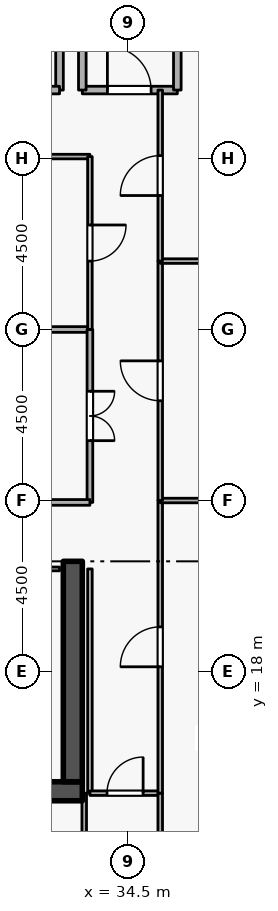
"""IFC4 building model, lengths in metres.
Left out: names, types, materials, properties, quantities, classifications, styles, units other than length and angle.
Written with IfcOpenShell. Run it as: python <this file> out.ifc"""

import sys

from ifc_helpers import new_model, si_unit, direction, frame, frame_2d, origin, place, context, subcontext, project, spatial, rectangle, extrude, element, fill, save


model = new_model("IFC4")
c1 = context("Model", 3, precision=1e-05, world=origin(), true_north=direction((0.0, 1.0)))
c2 = subcontext(c1, "Body", "Model", "MODEL_VIEW")
j1 = project(units=[si_unit("LENGTHUNIT", "METRE"), si_unit("PLANEANGLEUNIT", "RADIAN")], contexts=[c1])
p1 = place(None, origin())
s1 = spatial("IfcSite", under=j1, at=p1, CompositionType="ELEMENT")
p2 = place(p1, origin())
s2 = spatial("IfcBuilding", under=s1, at=p2, CompositionType="ELEMENT")
p3 = place(p2, frame((0.0, 0.0, 269.1)))
s3 = spatial("IfcBuildingStorey", under=s2, at=p3, CompositionType="ELEMENT", Elevation=269.1)
p4 = place(p3, frame((17.7, 14.85, 0.0), z_axis=(0.0, 0.0, 1.0), x_axis=(1.0, 0.0, 0.0)))
e1 = element("IfcWall", 1, at=p4, inside=s3, PredefinedType="SHEAR", context=c2, shape_type="SweptSolid", body=[
    extrude(rectangle(XDim=15.6, YDim=0.5, at=frame_2d((7.8, 0.0))), origin(), (0.0, 0.0, 1.0), 3.6),
])
p5 = place(p3, frame((33.05, 15.1, 0.0), z_axis=(0.0, 0.0, 1.0), x_axis=(0.0, 1.0, 0.0)))
e2 = element("IfcWall", 2, at=p5, inside=s3, PredefinedType="SHEAR", context=c2, shape_type="SweptSolid", body=[
    extrude(rectangle(XDim=5.8, YDim=0.5, at=frame_2d((2.9, 0.0))), origin(), (0.0, 0.0, 1.0), 3.6),
])
p6 = place(p3, frame((33.3, 33.3, 0.0), z_axis=(0.0, 0.0, 1.0), x_axis=(1.0, 0.0, 0.0)))
e3 = element("IfcWall", 3, at=p6, inside=s3, PredefinedType="STANDARD", context=c2, shape_type="SweptSolid", body=[
    extrude(rectangle(XDim=2.5, YDim=0.2, at=frame_2d((1.25, 0.0))), origin(), (0.0, 0.0, 1.0), 3.34),
])
p7 = place(p6, frame((0.66, 0.0, 0.0)))
e4 = element("IfcOpeningElement", 4, at=p7, cuts=e3, PredefinedType="OPENING", context=c2, shape_type="SweptSolid", body=[
    extrude(rectangle(XDim=1.15, YDim=2.1, at=frame_2d((0.575, 1.05))), frame((0.0, 0.11, 0.0), z_axis=(0.0, -1.0, 0.0), x_axis=(1.0, 0.0, 0.0)), (0.0, 0.0, 1.0), 0.22),
])
p8 = place(p3, frame((35.8, 33.3, 0.0), z_axis=(0.0, 0.0, 1.0), x_axis=(0.0, 1.0, 0.0)))
e5 = element("IfcWall", 5, at=p8, inside=s3, PredefinedType="STANDARD", context=c2, shape_type="SweptSolid", body=[
    extrude(rectangle(XDim=5.7, YDim=0.2, at=frame_2d((2.85, 0.0))), origin(), (0.0, 0.0, 1.0), 3.34),
])
p9 = place(p3, frame((33.3, 35.6, 0.0), z_axis=(0.0, 0.0, 1.0), x_axis=(0.0, -1.0, 0.0)))
e6 = element("IfcWall", 6, at=p9, inside=s3, PredefinedType="STANDARD", context=c2, shape_type="SweptSolid", body=[
    extrude(rectangle(XDim=2.3, YDim=0.2, at=frame_2d((1.15, 0.0))), origin(), (0.0, 0.0, 1.0), 2.545),
])
p10 = place(p3, frame((32.7, 35.35, 0.0), z_axis=(0.0, 0.0, 1.0), x_axis=(0.0, -1.0, 0.0)))
e7 = element("IfcWall", 7, at=p10, inside=s3, PredefinedType="STANDARD", context=c2, shape_type="SweptSolid", body=[
    extrude(rectangle(XDim=2.05, YDim=0.2, at=frame_2d((1.025, 0.0))), origin(), (0.0, 0.0, 1.0), 2.545),
])
p11 = place(p3, frame((32.7, 33.3, 0.0), z_axis=(0.0, 0.0, 1.0), x_axis=(-1.0, 0.0, 0.0)))
e8 = element("IfcWall", 8, at=p11, inside=s3, PredefinedType="STANDARD", context=c2, shape_type="SweptSolid", body=[
    extrude(rectangle(XDim=2.35, YDim=0.2, at=frame_2d((1.175, 0.0))), origin(), (0.0, 0.0, 1.0), 3.34),
])
p12 = place(p11, frame((0.6, 0.0, 0.0)))
e9 = element("IfcOpeningElement", 9, at=p12, cuts=e8, PredefinedType="OPENING", context=c2, shape_type="SweptSolid", body=[
    extrude(rectangle(XDim=1.15, YDim=2.1, at=frame_2d((0.575, 1.05))), frame((0.0, 0.11, 0.0), z_axis=(0.0, -1.0, 0.0), x_axis=(1.0, 0.0, 0.0)), (0.0, 0.0, 1.0), 0.22),
])
p13 = place(p3, frame((30.55, 20.7, 0.0), z_axis=(0.0, 0.0, 1.0), x_axis=(1.0, 0.0, 0.0)))
e10 = element("IfcWall", 10, at=p13, inside=s3, PredefinedType="PARTITIONING", context=c2, shape_type="SweptSolid", body=[
    extrude(rectangle(XDim=2.15, YDim=0.1, at=frame_2d((1.075, 0.0))), origin(), (0.0, 0.0, 1.0), 3.34),
])
p14 = place(p13, frame((0.6, 0.0, 0.0)))
e11 = element("IfcOpeningElement", 11, at=p14, cuts=e10, PredefinedType="OPENING", context=c2, shape_type="SweptSolid", body=[
    extrude(rectangle(XDim=0.95, YDim=2.1, at=frame_2d((0.475, 1.05))), frame((0.0, 0.06, 0.0), z_axis=(0.0, -1.0, 0.0), x_axis=(1.0, 0.0, 0.0)), (0.0, 0.0, 1.0), 0.12),
])
p15 = place(p3, frame((33.5, 20.7, 0.0), z_axis=(0.0, 0.0, 1.0), x_axis=(0.0, -1.0, 0.0)))
e12 = element("IfcWall", 12, at=p15, inside=s3, PredefinedType="PARTITIONING", context=c2, shape_type="SweptSolid", body=[
    extrude(rectangle(XDim=5.9, YDim=0.12, at=frame_2d((2.95, 0.0))), origin(), (0.0, 0.0, 1.0), 3.34),
])
p16 = place(p3, frame((33.5, 14.8, 0.0), z_axis=(0.0, 0.0, 1.0), x_axis=(1.0, 0.0, 0.0)))
e13 = element("IfcWall", 13, at=p16, inside=s3, PredefinedType="PARTITIONING", context=c2, shape_type="SweptSolid", body=[
    extrude(rectangle(XDim=1.85, YDim=0.12, at=frame_2d((0.925, 0.0))), origin(), (0.0, 0.0, 1.0), 3.34),
])
p17 = place(p16, frame((0.45, 0.0, 0.0)))
e14 = element("IfcOpeningElement", 14, at=p17, cuts=e13, PredefinedType="OPENING", context=c2, shape_type="SweptSolid", body=[
    extrude(rectangle(XDim=0.95, YDim=2.1, at=frame_2d((0.475, 1.05))), frame((0.0, 0.07, 0.0), z_axis=(0.0, -1.0, 0.0), x_axis=(1.0, 0.0, 0.0)), (0.0, 0.0, 1.0), 0.14),
])
for number, where, z_axis, x_axis in (
    (15, (35.35, 14.8, 0.0), (0.0, 0.0, 1.0), (0.0, -1.0, 0.0)),
    (16, (33.35, 3.28, 0.0), (0.0, 0.0, 1.0), (0.0, 1.0, 0.0)),
):
    element("IfcWall", number, at=place(p3, frame(where, z_axis=z_axis, x_axis=x_axis)), inside=s3, PredefinedType="PARTITIONING", context=c2, shape_type="SweptSolid", body=[
        extrude(rectangle(XDim=11.52, YDim=0.12, at=frame_2d((5.76, 0.0))), origin(), (0.0, 0.0, 1.0), 3.34),
    ])
p18 = place(p3, frame((35.35, 14.8, 0.0), z_axis=(0.0, 0.0, 1.0), x_axis=(0.0, 1.0, 0.0)))
e17 = element("IfcWall", 17, at=p18, inside=s3, PredefinedType="PARTITIONING", context=c2, shape_type="SweptSolid", body=[
    extrude(rectangle(XDim=7.7, YDim=0.12, at=frame_2d((3.85, 0.0))), origin(), (0.0, 0.0, 1.0), 3.34),
])
p19 = place(p18, frame((3.325, 0.0, 0.0)))
e18 = element("IfcOpeningElement", 18, at=p19, cuts=e17, PredefinedType="OPENING", context=c2, shape_type="SweptSolid", body=[
    extrude(rectangle(XDim=1.05, YDim=2.1, at=frame_2d((0.525, 1.05))), frame((0.0, 0.07, 0.0), z_axis=(0.0, -1.0, 0.0), x_axis=(1.0, 0.0, 0.0)), (0.0, 0.0, 1.0), 0.14),
])
p20 = place(p3, frame((35.35, 22.5, 0.0), z_axis=(0.0, 0.0, 1.0), x_axis=(1.0, 0.0, 0.0)))
e19 = element("IfcWall", 19, at=p20, inside=s3, PredefinedType="PARTITIONING", context=c2, shape_type="SweptSolid", body=[
    extrude(rectangle(XDim=13.87, YDim=0.12, at=frame_2d((6.935, 0.0))), origin(), (0.0, 0.0, 1.0), 3.34),
])
p21 = place(p3, frame((35.35, 22.5, 0.0), z_axis=(0.0, 0.0, 1.0), x_axis=(0.0, 1.0, 0.0)))
e20 = element("IfcWall", 20, at=p21, inside=s3, PredefinedType="PARTITIONING", context=c2, shape_type="SweptSolid", body=[
    extrude(rectangle(XDim=6.3, YDim=0.12, at=frame_2d((3.15, 0.0))), origin(), (0.0, 0.0, 1.0), 3.34),
])
p22 = place(p21, frame((2.625, 0.0, 0.0)))
e21 = element("IfcOpeningElement", 21, at=p22, cuts=e20, PredefinedType="OPENING", context=c2, shape_type="SweptSolid", body=[
    extrude(rectangle(XDim=1.05, YDim=2.1, at=frame_2d((0.525, 1.05))), frame((0.0, 0.07, 0.0), z_axis=(0.0, -1.0, 0.0), x_axis=(1.0, 0.0, 0.0)), (0.0, 0.0, 1.0), 0.14),
])
p23 = place(p3, frame((35.35, 28.8, 0.0), z_axis=(0.0, 0.0, 1.0), x_axis=(1.0, 0.0, 0.0)))
e22 = element("IfcWall", 22, at=p23, inside=s3, PredefinedType="PARTITIONING", context=c2, shape_type="SweptSolid", body=[
    extrude(rectangle(XDim=13.87, YDim=0.12, at=frame_2d((6.935, 0.0))), origin(), (0.0, 0.0, 1.0), 3.34),
])
p24 = place(p3, frame((35.35, 28.8, 0.0), z_axis=(0.0, 0.0, 1.0), x_axis=(0.0, 1.0, 0.0)))
e23 = element("IfcWall", 23, at=p24, inside=s3, PredefinedType="PARTITIONING", context=c2, shape_type="SweptSolid", body=[
    extrude(rectangle(XDim=4.5, YDim=0.12, at=frame_2d((2.25, 0.0))), origin(), (0.0, 0.0, 1.0), 3.34),
])
p25 = place(p24, frame((1.725, 0.0, 0.0)))
e24 = element("IfcOpeningElement", 24, at=p25, cuts=e23, PredefinedType="OPENING", context=c2, shape_type="SweptSolid", body=[
    extrude(rectangle(XDim=1.05, YDim=2.1, at=frame_2d((0.525, 1.05))), frame((0.0, 0.07, 0.0), z_axis=(0.0, -1.0, 0.0), x_axis=(1.0, 0.0, 0.0)), (0.0, 0.0, 1.0), 0.14),
])
p26 = place(p3, frame((30.7, 27.0, 0.0), z_axis=(0.0, 0.0, 1.0), x_axis=(1.0, 0.0, 0.0)))
e25 = element("IfcWall", 25, at=p26, inside=s3, PredefinedType="PARTITIONING", context=c2, shape_type="SweptSolid", body=[
    extrude(rectangle(XDim=2.8, YDim=0.15, at=frame_2d((1.4, 0.0))), origin(), (0.0, 0.0, 1.0), 3.34),
])
p27 = place(p3, frame((33.5, 27.0, 0.0), z_axis=(0.0, 0.0, 1.0), x_axis=(0.0, -1.0, 0.0)))
e26 = element("IfcWall", 26, at=p27, inside=s3, PredefinedType="PARTITIONING", context=c2, shape_type="SweptSolid", body=[
    extrude(rectangle(XDim=4.55, YDim=0.15, at=frame_2d((2.275, 0.0))), origin(), (0.0, 0.0, 1.0), 3.34),
])
p28 = place(p27, frame((1.625, 0.0, 0.0)))
e27 = element("IfcOpeningElement", 27, at=p28, cuts=e26, PredefinedType="OPENING", context=c2, shape_type="SweptSolid", body=[
    extrude(rectangle(XDim=1.3, YDim=2.12, at=frame_2d((0.65, 1.06))), frame((0.0, 0.085, 0.0), z_axis=(0.0, -1.0, 0.0), x_axis=(1.0, 0.0, 0.0)), (0.0, 0.0, 1.0), 0.17),
])
p29 = place(p3, frame((33.5, 22.45, 0.0), z_axis=(0.0, 0.0, 1.0), x_axis=(-1.0, 0.0, 0.0)))
e28 = element("IfcWall", 28, at=p29, inside=s3, PredefinedType="PARTITIONING", context=c2, shape_type="SweptSolid", body=[
    extrude(rectangle(XDim=2.8, YDim=0.15, at=frame_2d((1.4, 0.0))), origin(), (0.0, 0.0, 1.0), 3.34),
])
p30 = place(p3, frame((30.7, 31.55, 0.0), z_axis=(0.0, 0.0, 1.0), x_axis=(1.0, 0.0, 0.0)))
e29 = element("IfcWall", 29, at=p30, inside=s3, PredefinedType="PARTITIONING", context=c2, shape_type="SweptSolid", body=[
    extrude(rectangle(XDim=2.8, YDim=0.12, at=frame_2d((1.4, 0.0))), origin(), (0.0, 0.0, 1.0), 3.34),
])
p31 = place(p3, frame((33.5, 31.55, 0.0), z_axis=(0.0, 0.0, 1.0), x_axis=(0.0, -1.0, 0.0)))
e30 = element("IfcWall", 30, at=p31, inside=s3, PredefinedType="PARTITIONING", context=c2, shape_type="SweptSolid", body=[
    extrude(rectangle(XDim=4.55, YDim=0.12, at=frame_2d((2.275, 0.0))), origin(), (0.0, 0.0, 1.0), 3.34),
])
p32 = place(p31, frame((1.8, 0.0, 0.0)))
e31 = element("IfcOpeningElement", 31, at=p32, cuts=e30, PredefinedType="OPENING", context=c2, shape_type="SweptSolid", body=[
    extrude(rectangle(XDim=0.95, YDim=2.1, at=frame_2d((0.475, 1.05))), frame((0.0, 0.07, 0.0), z_axis=(0.0, -1.0, 0.0), x_axis=(1.0, 0.0, 0.0)), (0.0, 0.0, 1.0), 0.14),
])
p33 = place(p7, origin())
e32 = element("IfcDoor", 32, at=p33, inside=s3, OperationType="SINGLE_SWING_LEFT", PredefinedType="DOOR", context=c2, shape_type="SweptSolid", body=[
    extrude(rectangle(XDim=1.15, YDim=2.1, at=frame_2d((0.575, 1.05))), frame((0.0, 0.025, 0.0), z_axis=(0.0, -1.0, 0.0), x_axis=(1.0, 0.0, 0.0)), (0.0, 0.0, 1.0), 0.05),
])
fill(e4, e32)
p34 = place(p17, origin())
e33 = element("IfcDoor", 33, at=p34, inside=s3, OperationType="SINGLE_SWING_RIGHT", PredefinedType="DOOR", context=c2, shape_type="SweptSolid", body=[
    extrude(rectangle(XDim=0.95, YDim=2.1, at=frame_2d((0.475, 1.05))), frame((0.0, 0.025, 0.0), z_axis=(0.0, -1.0, 0.0), x_axis=(1.0, 0.0, 0.0)), (0.0, 0.0, 1.0), 0.05),
])
fill(e14, e33)
p35 = place(p19, origin())
e34 = element("IfcDoor", 34, at=p35, inside=s3, OperationType="SINGLE_SWING_LEFT", PredefinedType="DOOR", context=c2, shape_type="SweptSolid", body=[
    extrude(rectangle(XDim=1.05, YDim=2.1, at=frame_2d((0.525, 1.05))), frame((0.0, 0.025, 0.0), z_axis=(0.0, -1.0, 0.0), x_axis=(1.0, 0.0, 0.0)), (0.0, 0.0, 1.0), 0.05),
])
fill(e18, e34)
p36 = place(p22, origin())
e35 = element("IfcDoor", 35, at=p36, inside=s3, OperationType="SINGLE_SWING_RIGHT", PredefinedType="DOOR", context=c2, shape_type="SweptSolid", body=[
    extrude(rectangle(XDim=1.05, YDim=2.1, at=frame_2d((0.525, 1.05))), frame((0.0, 0.025, 0.0), z_axis=(0.0, -1.0, 0.0), x_axis=(1.0, 0.0, 0.0)), (0.0, 0.0, 1.0), 0.05),
])
fill(e21, e35)
p37 = place(p25, origin())
e36 = element("IfcDoor", 36, at=p37, inside=s3, OperationType="SINGLE_SWING_LEFT", PredefinedType="DOOR", context=c2, shape_type="SweptSolid", body=[
    extrude(rectangle(XDim=1.05, YDim=2.1, at=frame_2d((0.525, 1.05))), frame((0.0, 0.025, 0.0), z_axis=(0.0, -1.0, 0.0), x_axis=(1.0, 0.0, 0.0)), (0.0, 0.0, 1.0), 0.05),
])
fill(e24, e36)
p38 = place(p28, origin())
e37 = element("IfcDoor", 37, at=p38, inside=s3, OperationType="DOUBLE_DOOR_SINGLE_SWING", PredefinedType="DOOR", context=c2, shape_type="SweptSolid", body=[
    extrude(rectangle(XDim=1.3, YDim=2.12, at=frame_2d((0.65, 1.06))), frame((0.0, 0.025, 0.0), z_axis=(0.0, -1.0, 0.0), x_axis=(1.0, 0.0, 0.0)), (0.0, 0.0, 1.0), 0.05),
])
fill(e27, e37)
p39 = place(p32, origin())
e38 = element("IfcDoor", 38, at=p39, inside=s3, OperationType="SINGLE_SWING_LEFT", PredefinedType="DOOR", context=c2, shape_type="SweptSolid", body=[
    extrude(rectangle(XDim=0.95, YDim=2.1, at=frame_2d((0.475, 1.05))), frame((0.0, 0.025, 0.0), z_axis=(0.0, -1.0, 0.0), x_axis=(1.0, 0.0, 0.0)), (0.0, 0.0, 1.0), 0.05),
])
fill(e31, e38)
save(model, sys.argv[1])
